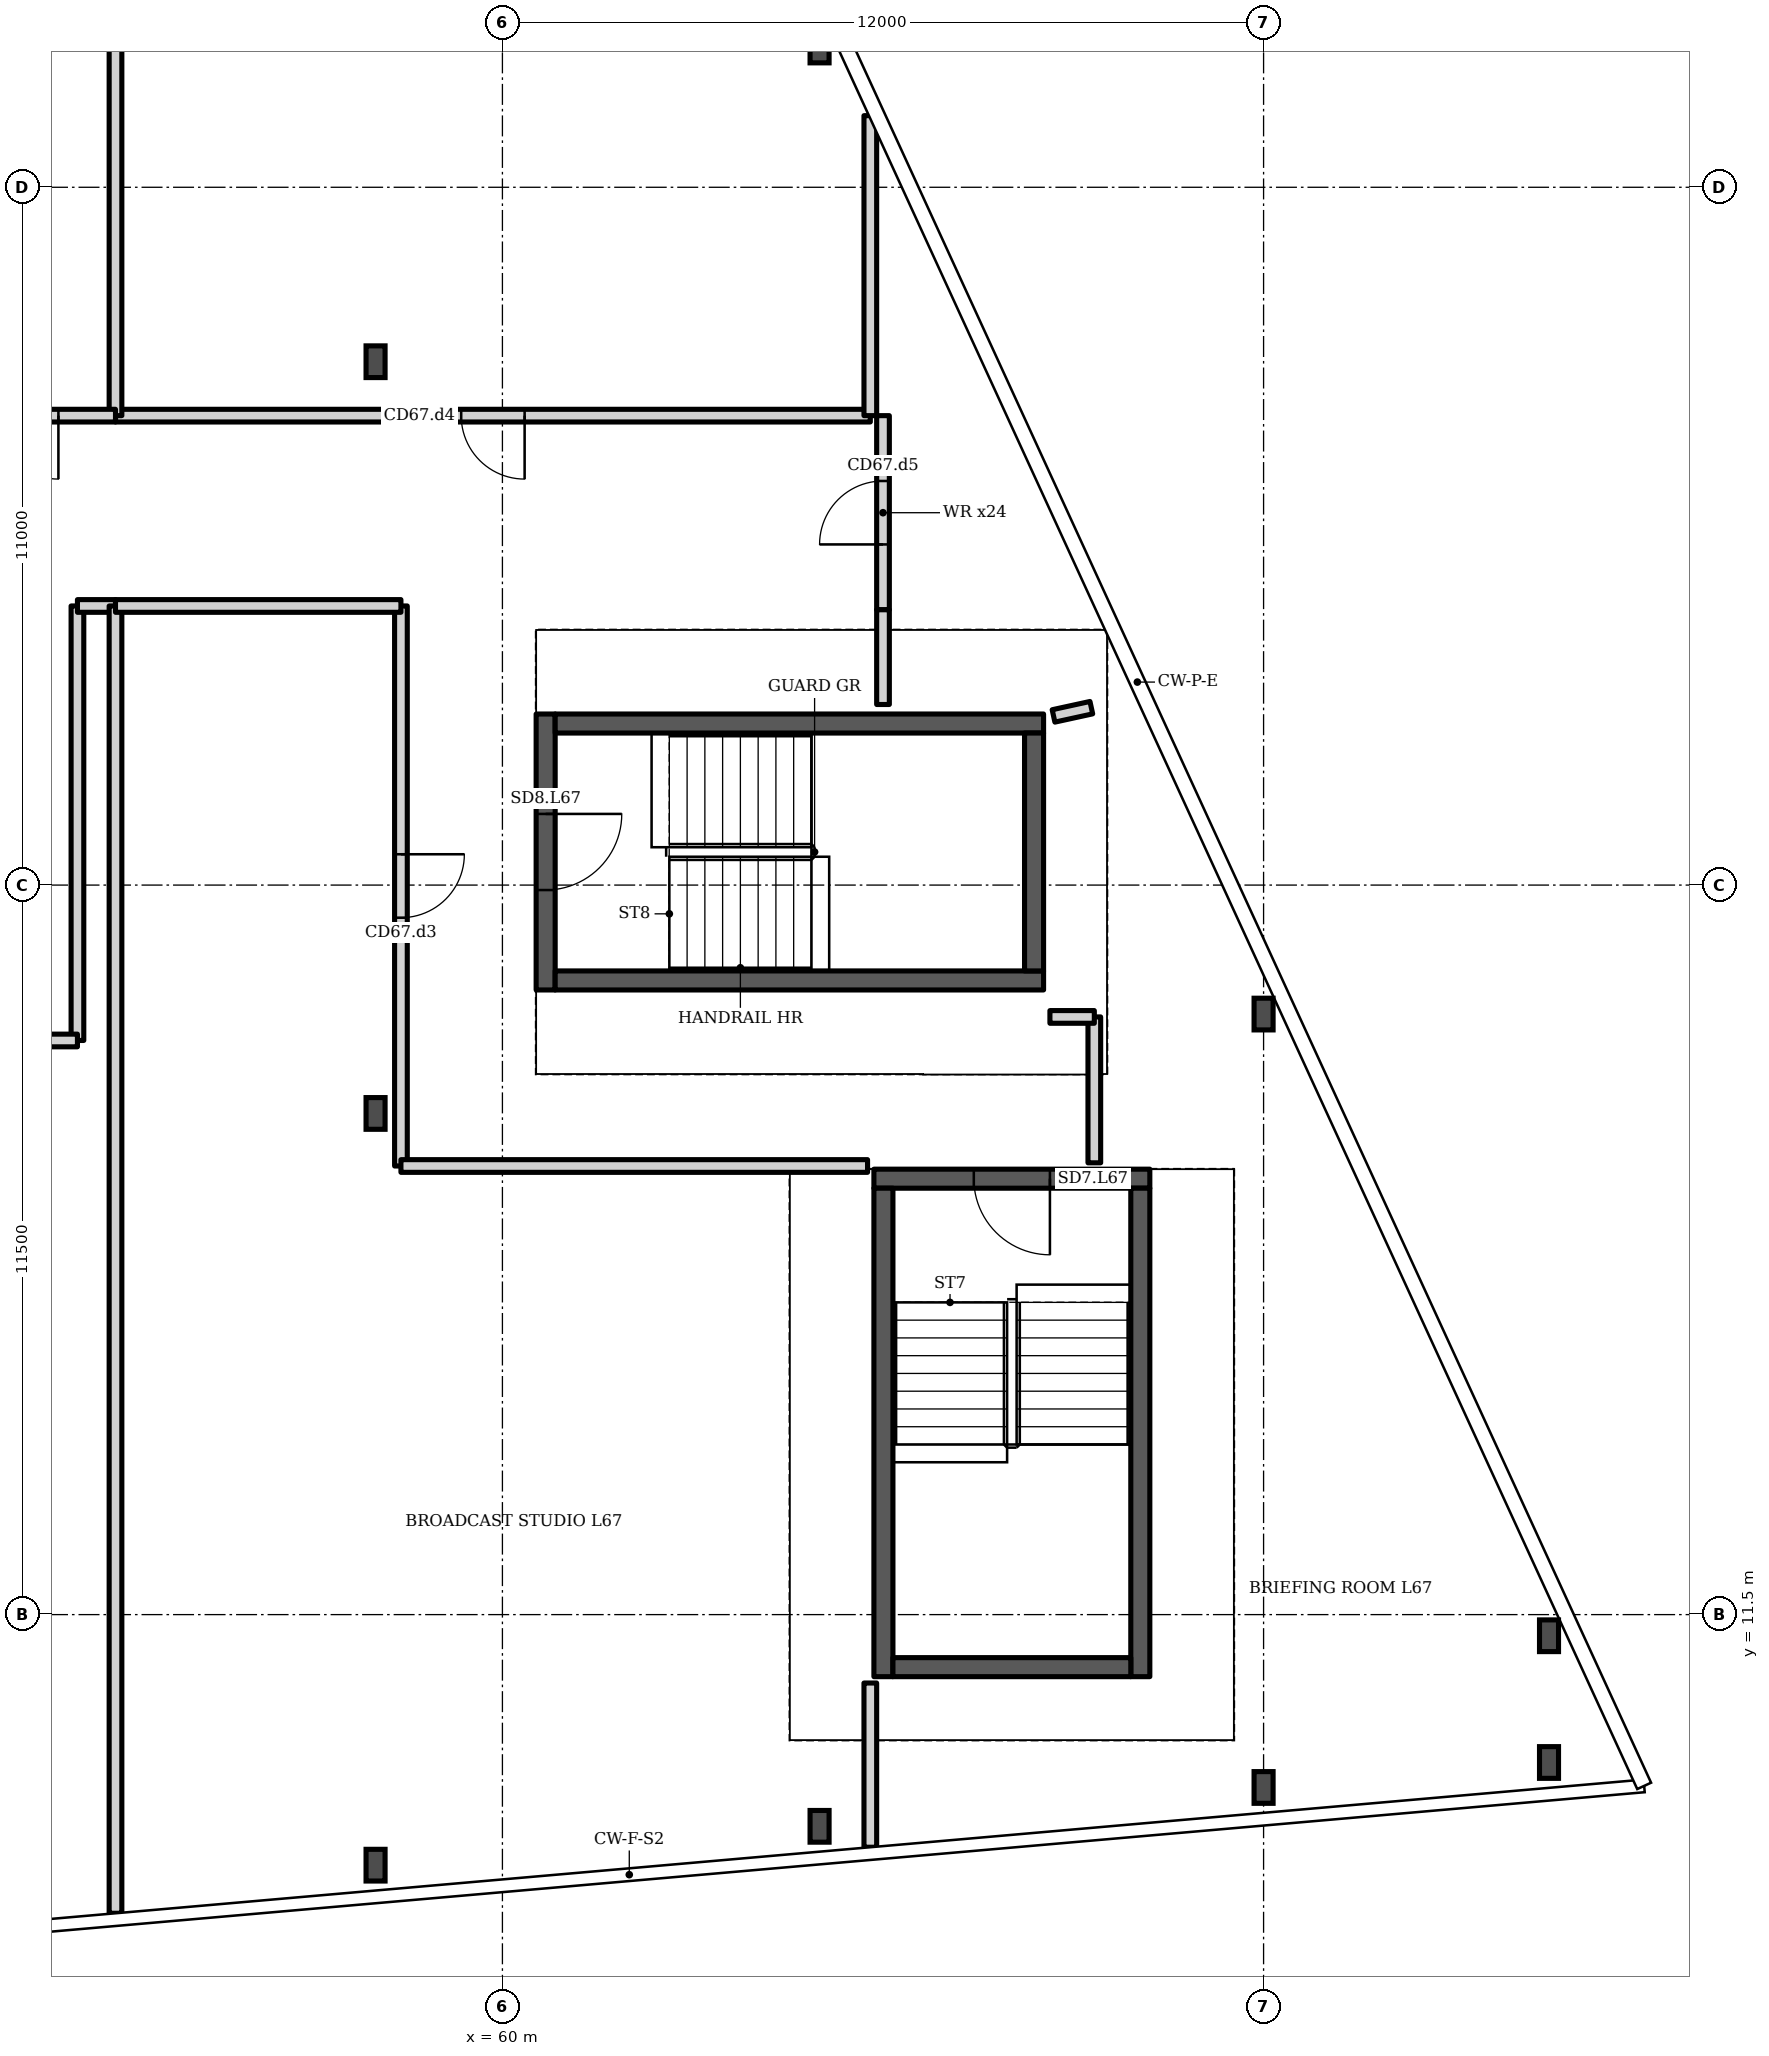
"""IFC4 building model, lengths in metres.
Left out: names, types, materials, properties, quantities, classifications, styles, units other than length and angle.
Written with IfcOpenShell. Run it as: python <this file> out.ifc"""

import sys

from ifc_helpers import new_model, si_unit, direction, frame, frame_2d, origin, origin_2d, place, context, subcontext, project, spatial, rectangle, i_section, extrude, element, fill, save


model = new_model("IFC4")
c1 = context("Model", 3, precision=1e-05, world=origin(), true_north=direction((0.0, 1.0)))
c2 = subcontext(c1, "Body", "Model", "MODEL_VIEW")
j1 = project(units=[si_unit("LENGTHUNIT", "METRE"), si_unit("PLANEANGLEUNIT", "RADIAN")], contexts=[c1])
p1 = place(None, origin())
s1 = spatial("IfcSite", under=j1, at=p1, CompositionType="ELEMENT")
p2 = place(p1, origin())
s2 = spatial("IfcBuilding", under=s1, at=p2, CompositionType="ELEMENT")
p3 = place(p2, frame((0.0, 0.0, 264.3)))
s3 = spatial("IfcBuildingStorey", under=s2, at=p3, CompositionType="ELEMENT", Elevation=264.3)
for number, where, z_axis, x_axis in (
    (1, (58.0, 7.55, 0.0), (0.0, 0.0, 1.0), (1.0, 0.0, 0.0)),
    (2, (58.0, 19.4, 0.0), (0.0, 0.0, 1.0), (1.0, 0.0, 0.0)),
    (3, (58.0, 31.25, 0.0), (0.0, 0.0, 1.0), (1.0, 0.0, 0.0)),
    (4, (65.0, 8.163, 0.0), (0.0, 0.0, 1.0), (1.0, 0.0, 0.0)),
    (5, (65.0, 36.211, 0.0), (0.0, 0.0, 1.0), (1.0, 0.0, 0.0)),
    (6, (72.0, 8.775, 0.0), (0.0, 0.0, 1.0), (1.0, 0.0, 0.0)),
    (7, (72.0, 20.967, 0.0), (0.0, 0.0, 1.0), (1.0, 0.0, 0.0)),
    (8, (76.5, 9.169, 0.0), (0.0, 0.0, 1.0), (1.0, 0.0, 0.0)),
    (9, (76.5, 11.167, 0.0), (0.0, 0.0, 1.0), (1.0, 0.0, 0.0)),
):
    element("IfcColumn", number, at=place(p3, frame(where, z_axis=z_axis, x_axis=x_axis)), inside=s3, PredefinedType="COLUMN", context=c2, shape_type="SweptSolid", body=[
        extrude(i_section(OverallWidth=0.3, OverallDepth=0.5, WebThickness=0.014, FlangeThickness=0.028, FilletRadius=0.027, at=origin_2d()), origin(), (0.0, 0.0, 1.0), 3.2),
    ])
p4 = place(p3, frame((53.3, 20.55, 0.0), z_axis=(0.0, 0.0, 1.0), x_axis=(0.0, 1.0, 0.0)))
e10 = element("IfcWall", 10, at=p4, inside=s3, PredefinedType="PARTITIONING", context=c2, shape_type="SweptSolid", body=[
    extrude(rectangle(XDim=6.85, YDim=0.2, at=frame_2d((3.425, 0.0))), origin(), (0.0, 0.0, 1.0), 2.8),
])
p5 = place(p3, frame((53.3, 27.4, 0.0), z_axis=(0.0, 0.0, 1.0), x_axis=(1.0, 0.0, 0.0)))
e11 = element("IfcWall", 11, at=p5, inside=s3, PredefinedType="PARTITIONING", context=c2, shape_type="SweptSolid", body=[
    extrude(rectangle(XDim=0.6, YDim=0.2, at=frame_2d((0.3, 0.0))), origin(), (0.0, 0.0, 1.0), 2.8),
])
p6 = place(p3, frame((50.466, 20.55, 0.0), z_axis=(0.0, 0.0, 1.0), x_axis=(1.0, 0.0, 0.0)))
e12 = element("IfcWall", 12, at=p6, inside=s3, PredefinedType="PARTITIONING", context=c2, shape_type="SweptSolid", body=[
    extrude(rectangle(XDim=2.834, YDim=0.2, at=frame_2d((1.417, 0.0))), origin(), (0.0, 0.0, 1.0), 2.8),
])
p7 = place(p3, frame((53.9, 27.4, 0.0), z_axis=(0.0, 0.0, 1.0), x_axis=(0.0, -1.0, 0.0)))
e13 = element("IfcWall", 13, at=p7, inside=s3, PredefinedType="PARTITIONING", context=c2, shape_type="SweptSolid", body=[
    extrude(rectangle(XDim=20.608, YDim=0.2, at=frame_2d((10.304, 0.0))), origin(), (0.0, 0.0, 1.0), 2.8),
])
p8 = place(p3, frame((58.4, 27.4, 0.0), z_axis=(0.0, 0.0, 1.0), x_axis=(0.0, -1.0, 0.0)))
e14 = element("IfcWall", 14, at=p8, inside=s3, PredefinedType="PARTITIONING", context=c2, shape_type="SweptSolid", body=[
    extrude(rectangle(XDim=8.828, YDim=0.2, at=frame_2d((4.414, 0.0))), origin(), (0.0, 0.0, 1.0), 2.8),
])
p9 = place(p8, frame((3.914, 0.0, 0.0)))
e15 = element("IfcOpeningElement", 15, at=p9, cuts=e14, PredefinedType="OPENING", context=c2, shape_type="SweptSolid", body=[
    extrude(rectangle(XDim=1.0, YDim=2.1, at=frame_2d((0.5, 1.05))), frame((0.0, 0.11, 0.0), z_axis=(0.0, -1.0, 0.0), x_axis=(1.0, 0.0, 0.0)), (0.0, 0.0, 1.0), 0.22),
])
p10 = place(p3, frame((58.4, 18.572, 0.0), z_axis=(0.0, 0.0, 1.0), x_axis=(1.0, 0.0, 0.0)))
e16 = element("IfcWall", 16, at=p10, inside=s3, PredefinedType="PARTITIONING", context=c2, shape_type="SweptSolid", body=[
    extrude(rectangle(XDim=7.357, YDim=0.2, at=frame_2d((3.678, 0.0))), origin(), (0.0, 0.0, 1.0), 2.8),
])
p11 = place(p3, frame((53.9, 27.4, 0.0), z_axis=(0.0, 0.0, 1.0), x_axis=(1.0, 0.0, 0.0)))
e17 = element("IfcWall", 17, at=p11, inside=s3, PredefinedType="PARTITIONING", context=c2, shape_type="SweptSolid", body=[
    extrude(rectangle(XDim=4.5, YDim=0.2, at=frame_2d((2.25, 0.0))), origin(), (0.0, 0.0, 1.0), 2.8),
])
p12 = place(p3, frame((65.8, 10.422, 0.0), z_axis=(0.0, 0.0, 1.0), x_axis=(0.0, -1.0, 0.0)))
e18 = element("IfcWall", 18, at=p12, inside=s3, PredefinedType="PARTITIONING", context=c2, shape_type="SweptSolid", body=[
    extrude(rectangle(XDim=2.589, YDim=0.2, at=frame_2d((1.294, 0.0))), origin(), (0.0, 0.0, 1.0), 2.8),
])
p13 = place(p3, frame((65.8, 30.4, 0.0), z_axis=(0.0, 0.0, 1.0), x_axis=(-1.0, 0.0, 0.0)))
e19 = element("IfcWall", 19, at=p13, inside=s3, PredefinedType="PARTITIONING", context=c2, shape_type="SweptSolid", body=[
    extrude(rectangle(XDim=11.9, YDim=0.2, at=frame_2d((5.95, 0.0))), origin(), (0.0, 0.0, 1.0), 2.8),
])
p14 = place(p13, frame((5.45, 0.0, 0.0)))
e20 = element("IfcOpeningElement", 20, at=p14, cuts=e19, PredefinedType="OPENING", context=c2, shape_type="SweptSolid", body=[
    extrude(rectangle(XDim=1.0, YDim=2.1, at=frame_2d((0.5, 1.05))), frame((0.0, 0.11, 0.0), z_axis=(0.0, -1.0, 0.0), x_axis=(1.0, 0.0, 0.0)), (0.0, 0.0, 1.0), 0.22),
])
p15 = place(p3, frame((65.8, 35.129, 0.0), z_axis=(0.0, 0.0, 1.0), x_axis=(0.0, -1.0, 0.0)))
e21 = element("IfcWall", 21, at=p15, inside=s3, PredefinedType="PARTITIONING", context=c2, shape_type="SweptSolid", body=[
    extrude(rectangle(XDim=4.729, YDim=0.2, at=frame_2d((2.365, 0.0))), origin(), (0.0, 0.0, 1.0), 2.8),
])
p16 = place(p3, frame((53.9, 30.4, 0.0), z_axis=(0.0, 0.0, 1.0), x_axis=(0.0, 1.0, 0.0)))
e22 = element("IfcWall", 22, at=p16, inside=s3, PredefinedType="PARTITIONING", context=c2, shape_type="SweptSolid", body=[
    extrude(rectangle(XDim=13.1, YDim=0.2, at=frame_2d((6.55, 0.0))), origin(), (0.0, 0.0, 1.0), 2.8),
])
p17 = place(p3, frame((69.332, 18.622, 0.0), z_axis=(0.0, 0.0, 1.0), x_axis=(0.0, 1.0, 0.0)))
e23 = element("IfcWall", 23, at=p17, inside=s3, PredefinedType="PARTITIONING", context=c2, shape_type="SweptSolid", body=[
    extrude(rectangle(XDim=2.3, YDim=0.2, at=frame_2d((1.15, 0.0))), origin(), (0.0, 0.0, 1.0), 2.8),
])
p18 = place(p3, frame((69.332, 20.922, 0.0), z_axis=(0.0, 0.0, 1.0), x_axis=(-1.0, 0.0, 0.0)))
e24 = element("IfcWall", 24, at=p18, inside=s3, PredefinedType="PARTITIONING", context=c2, shape_type="SweptSolid", body=[
    extrude(rectangle(XDim=0.7, YDim=0.2, at=frame_2d((0.35, 0.0))), origin(), (0.0, 0.0, 1.0), 2.8),
])
p19 = place(p3, frame((66.0, 27.34, 0.0), z_axis=(0.0, 0.0, 1.0), x_axis=(0.0, 1.0, 0.0)))
e25 = element("IfcWall", 25, at=p19, inside=s3, PredefinedType="PARTITIONING", context=c2, shape_type="SweptSolid", body=[
    extrude(rectangle(XDim=3.06, YDim=0.2, at=frame_2d((1.53, 0.0))), origin(), (0.0, 0.0, 1.0), 2.8),
])
p20 = place(p19, frame((1.03, 0.0, 0.0)))
e26 = element("IfcOpeningElement", 26, at=p20, cuts=e25, PredefinedType="OPENING", context=c2, shape_type="SweptSolid", body=[
    extrude(rectangle(XDim=1.0, YDim=2.1, at=frame_2d((0.5, 1.05))), frame((0.0, 0.11, 0.0), z_axis=(0.0, -1.0, 0.0), x_axis=(1.0, 0.0, 0.0)), (0.0, 0.0, 1.0), 0.22),
])
p21 = place(p3, frame((53.9, 30.4, 0.0), z_axis=(0.0, 0.0, 1.0), x_axis=(-1.0, 0.0, 0.0)))
e27 = element("IfcWall", 27, at=p21, inside=s3, PredefinedType="PARTITIONING", context=c2, shape_type="SweptSolid", body=[
    extrude(rectangle(XDim=2.8, YDim=0.2, at=frame_2d((1.4, 0.0))), origin(), (0.0, 0.0, 1.0), 2.8),
])
p22 = place(p21, frame((0.9, 0.0, 0.0)))
e28 = element("IfcOpeningElement", 28, at=p22, cuts=e27, PredefinedType="OPENING", context=c2, shape_type="SweptSolid", body=[
    extrude(rectangle(XDim=1.0, YDim=2.1, at=frame_2d((0.5, 1.05))), frame((0.0, 0.11, 0.0), z_axis=(0.0, -1.0, 0.0), x_axis=(1.0, 0.0, 0.0)), (0.0, 0.0, 1.0), 0.22),
])
p23 = place(p3, frame((68.689, 25.667, 0.0), z_axis=(0.0, 0.0, 1.0), x_axis=(0.976941, 0.213493, 0.0)))
e29 = element("IfcWall", 29, at=p23, inside=s3, PredefinedType="PARTITIONING", context=c2, shape_type="SweptSolid", body=[
    extrude(rectangle(XDim=0.61, YDim=0.2, at=frame_2d((0.305, 0.0))), origin(), (0.0, 0.0, 1.0), 2.8),
])
p24 = place(p3, frame((66.0, 25.847, 0.0), z_axis=(0.0, 0.0, 1.0), x_axis=(0.0, 1.0, 0.0)))
e30 = element("IfcWall", 30, at=p24, inside=s3, PredefinedType="PARTITIONING", context=c2, shape_type="SweptSolid", body=[
    extrude(rectangle(XDim=1.493, YDim=0.2, at=frame_2d((0.747, 0.0))), origin(), (0.0, 0.0, 1.0), 2.8),
])
p25 = place(p3, frame((65.857, 18.372, 0.0), z_axis=(0.0, 0.0, 1.0), x_axis=(1.0, 0.0, 0.0)))
e31 = element("IfcWall", 31, at=p25, inside=s3, PredefinedType="SHEAR", context=c2, shape_type="SweptSolid", body=[
    extrude(rectangle(XDim=4.35, YDim=0.3, at=frame_2d((2.175, 0.0))), origin(), (0.0, 0.0, 1.0), 2.8),
])
p26 = place(p25, frame((1.575, 0.0, 0.0)))
e32 = element("IfcOpeningElement", 32, at=p26, cuts=e31, PredefinedType="OPENING", context=c2, shape_type="SweptSolid", body=[
    extrude(rectangle(XDim=1.2, YDim=2.1, at=frame_2d((0.6, 1.05))), frame((0.0, 0.16, 0.0), z_axis=(0.0, -1.0, 0.0), x_axis=(1.0, 0.0, 0.0)), (0.0, 0.0, 1.0), 0.32),
])
p27 = place(p3, frame((60.682, 21.347, 0.0), z_axis=(0.0, 0.0, 1.0), x_axis=(0.0, 1.0, 0.0)))
e33 = element("IfcWall", 33, at=p27, inside=s3, PredefinedType="SHEAR", context=c2, shape_type="SweptSolid", body=[
    extrude(rectangle(XDim=4.35, YDim=0.3, at=frame_2d((2.175, 0.0))), origin(), (0.0, 0.0, 1.0), 2.8),
])
p28 = place(p27, frame((1.575, 0.0, 0.0)))
e34 = element("IfcOpeningElement", 34, at=p28, cuts=e33, PredefinedType="OPENING", context=c2, shape_type="SweptSolid", body=[
    extrude(rectangle(XDim=1.2, YDim=2.1, at=frame_2d((0.6, 1.05))), frame((0.0, 0.16, 0.0), z_axis=(0.0, -1.0, 0.0), x_axis=(1.0, 0.0, 0.0)), (0.0, 0.0, 1.0), 0.32),
])
for number, where, z_axis, x_axis in (
    (35, (66.007, 10.522, 0.0), (0.0, 0.0, 1.0), (0.0, 1.0, 0.0)),
    (36, (70.057, 10.522, 0.0), (0.0, 0.0, 1.0), (0.0, 1.0, 0.0)),
):
    element("IfcWall", number, at=place(p3, frame(where, z_axis=z_axis, x_axis=x_axis)), inside=s3, PredefinedType="SHEAR", context=c2, shape_type="SweptSolid", body=[
        extrude(rectangle(XDim=7.7, YDim=0.3, at=frame_2d((3.85, 0.0))), origin(), (0.0, 0.0, 1.0), 2.8),
    ])
p29 = place(p3, frame((66.156, 10.672, 0.0), z_axis=(0.0, 0.0, 1.0), x_axis=(1.0, 0.0, 0.0)))
e37 = element("IfcWall", 37, at=p29, inside=s3, PredefinedType="SHEAR", context=c2, shape_type="SweptSolid", body=[
    extrude(rectangle(XDim=3.75, YDim=0.3, at=frame_2d((1.875, 0.0))), origin(), (0.0, 0.0, 1.0), 2.8),
])
for number, where, z_axis, x_axis in (
    (38, (60.832, 21.497, 0.0), (0.0, 0.0, 1.0), (1.0, 0.0, 0.0)),
    (39, (60.832, 25.547, 0.0), (0.0, 0.0, 1.0), (1.0, 0.0, 0.0)),
):
    element("IfcWall", number, at=place(p3, frame(where, z_axis=z_axis, x_axis=x_axis)), inside=s3, PredefinedType="SHEAR", context=c2, shape_type="SweptSolid", body=[
        extrude(rectangle(XDim=7.7, YDim=0.3, at=frame_2d((3.85, 0.0))), origin(), (0.0, 0.0, 1.0), 2.8),
    ])
p30 = place(p3, frame((68.382, 21.647, 0.0), z_axis=(0.0, 0.0, 1.0), x_axis=(0.0, 1.0, 0.0)))
e40 = element("IfcWall", 40, at=p30, inside=s3, PredefinedType="SHEAR", context=c2, shape_type="SweptSolid", body=[
    extrude(rectangle(XDim=3.75, YDim=0.3, at=frame_2d((1.875, 0.0))), origin(), (0.0, 0.0, 1.0), 2.8),
])
p31 = place(p9, origin())
e41 = element("IfcDoor", 41, at=p31, inside=s3, OperationType="SINGLE_SWING_LEFT", PredefinedType="DOOR", context=c2, shape_type="SweptSolid", body=[
    extrude(rectangle(XDim=1.0, YDim=2.1, at=frame_2d((0.5, 1.05))), frame((0.0, 0.025, 0.0), z_axis=(0.0, -1.0, 0.0), x_axis=(1.0, 0.0, 0.0)), (0.0, 0.0, 1.0), 0.05),
])
fill(e15, e41)
p32 = place(p14, origin())
e42 = element("IfcDoor", 42, at=p32, inside=s3, OperationType="SINGLE_SWING_LEFT", PredefinedType="DOOR", context=c2, shape_type="SweptSolid", body=[
    extrude(rectangle(XDim=1.0, YDim=2.1, at=frame_2d((0.5, 1.05))), frame((0.0, 0.025, 0.0), z_axis=(0.0, -1.0, 0.0), x_axis=(1.0, 0.0, 0.0)), (0.0, 0.0, 1.0), 0.05),
])
fill(e20, e42)
p33 = place(p20, origin())
e43 = element("IfcDoor", 43, at=p33, inside=s3, OperationType="SINGLE_SWING_LEFT", PredefinedType="DOOR", context=c2, shape_type="SweptSolid", body=[
    extrude(rectangle(XDim=1.0, YDim=2.1, at=frame_2d((0.5, 1.05))), frame((0.0, 0.025, 0.0), z_axis=(0.0, -1.0, 0.0), x_axis=(1.0, 0.0, 0.0)), (0.0, 0.0, 1.0), 0.05),
])
fill(e26, e43)
p34 = place(p22, origin())
e44 = element("IfcDoor", 44, at=p34, inside=s3, OperationType="SINGLE_SWING_LEFT", PredefinedType="DOOR", context=c2, shape_type="SweptSolid", body=[
    extrude(rectangle(XDim=1.0, YDim=2.1, at=frame_2d((0.5, 1.05))), frame((0.0, 0.025, 0.0), z_axis=(0.0, -1.0, 0.0), x_axis=(1.0, 0.0, 0.0)), (0.0, 0.0, 1.0), 0.05),
])
fill(e28, e44)
p35 = place(p26, origin())
e45 = element("IfcDoor", 45, at=p35, inside=s3, OperationType="SINGLE_SWING_RIGHT", PredefinedType="DOOR", context=c2, shape_type="SweptSolid", body=[
    extrude(rectangle(XDim=1.2, YDim=2.1, at=frame_2d((0.6, 1.05))), frame((0.0, 0.025, 0.0), z_axis=(0.0, -1.0, 0.0), x_axis=(1.0, 0.0, 0.0)), (0.0, 0.0, 1.0), 0.05),
])
fill(e32, e45)
p36 = place(p28, origin())
e46 = element("IfcDoor", 46, at=p36, inside=s3, OperationType="SINGLE_SWING_RIGHT", PredefinedType="DOOR", context=c2, shape_type="SweptSolid", body=[
    extrude(rectangle(XDim=1.2, YDim=2.1, at=frame_2d((0.6, 1.05))), frame((0.0, 0.025, 0.0), z_axis=(0.0, -1.0, 0.0), x_axis=(1.0, 0.0, 0.0)), (0.0, 0.0, 1.0), 0.05),
])
fill(e34, e46)
save(model, sys.argv[1])
